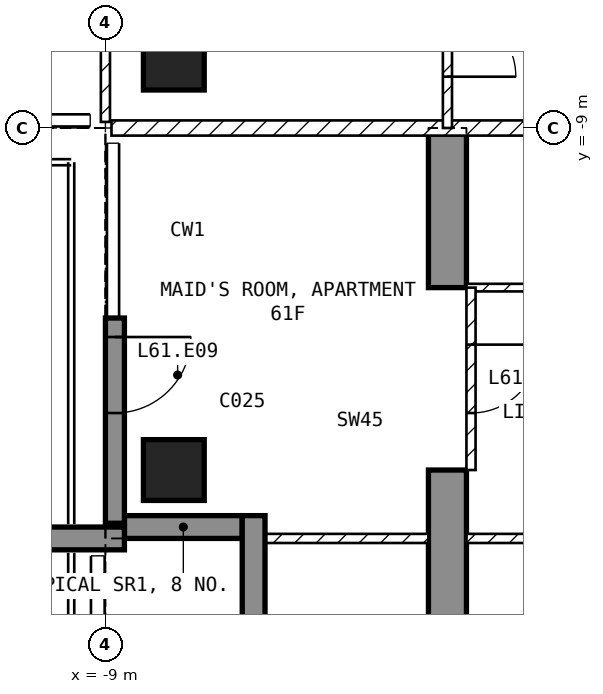
"""IFC4 building model, lengths in metres.
Left out: names, types, materials, properties, quantities, classifications, styles, units other than length and angle.
Written with IfcOpenShell. Run it as: python <this file> out.ifc"""

import sys

from ifc_helpers import new_model, si_unit, direction, frame, frame_2d, origin, origin_2d, place, context, subcontext, project, spatial, polyline, rectangle, outline, extrude, element, fill, save


model = new_model("IFC4")
c1 = context("Model", 3, precision=1e-05, world=origin(), true_north=direction((0.0, 1.0)))
c2 = subcontext(c1, "Body", "Model", "MODEL_VIEW")
j1 = project(units=[si_unit("LENGTHUNIT", "METRE"), si_unit("PLANEANGLEUNIT", "RADIAN")], contexts=[c1])
p1 = place(None, origin())
s1 = spatial("IfcSite", under=j1, at=p1, CompositionType="ELEMENT")
p2 = place(p1, origin())
s2 = spatial("IfcBuilding", under=s1, at=p2, CompositionType="ELEMENT")
p3 = place(p2, frame((0.0, 0.0, 243.0)))
s3 = spatial("IfcBuildingStorey", under=s2, at=p3, CompositionType="ELEMENT", Elevation=243.0)
for number, where, z_axis, x_axis in (
    (1, (-8.1, -13.5, -0.25), (0.0, 0.0, 1.0), (1.0, 0.0, 0.0)),
    (2, (-8.1, -8.1, -0.25), (0.0, 0.0, 1.0), (1.0, 0.0, 0.0)),
):
    element("IfcColumn", number, at=place(p3, frame(where, z_axis=z_axis, x_axis=x_axis)), inside=s3, PredefinedType="COLUMN", context=c2, shape_type="SweptSolid", body=[
        extrude(rectangle(XDim=0.8, YDim=0.8, at=origin_2d()), origin(), (0.0, 0.0, 1.0), 3.5),
    ])
p4 = place(p3, frame((-4.75, -16.7, -0.25), z_axis=(1.0, 0.0, 0.0), x_axis=(0.0, 1.0, 0.0)))
e3 = element("IfcWall", 3, at=p4, inside=s3, PredefinedType="SHEAR", context=c2, shape_type="SweptSolid", body=[
    extrude(outline(polyline([(0.0, 0.0), (3.2, 0.0), (3.2, 2.65), (5.6, 2.65), (5.6, 0.0), (7.7, 0.0), (7.7, 3.5), (0.0, 3.5), (0.0, 0.0)])), origin(), (0.0, 0.0, 1.0), 0.5),
])
p5 = place(p3, frame((-8.875, -11.5, 0.0), z_axis=(0.0, 0.0, 1.0), x_axis=(0.0, -1.0, 0.0)))
e4 = element("IfcWall", 4, at=p5, inside=s3, PredefinedType="SOLIDWALL", context=c2, shape_type="SweptSolid", body=[
    extrude(rectangle(XDim=2.7, YDim=0.25, at=frame_2d((1.35, 0.0))), origin(), (0.0, 0.0, 1.0), 3.25),
])
p6 = place(p5, frame((0.25, 0.0, 0.0)))
e5 = element("IfcOpeningElement", 5, at=p6, cuts=e4, PredefinedType="OPENING", context=c2, shape_type="SweptSolid", body=[
    extrude(rectangle(XDim=1.0, YDim=2.4, at=frame_2d((0.5, 1.2))), frame((0.0, 0.135, 0.0), z_axis=(0.0, -1.0, 0.0), x_axis=(1.0, 0.0, 0.0)), (0.0, 0.0, 1.0), 0.27),
])
p7 = place(p3, frame((-8.75, -14.25, 0.0), z_axis=(0.0, 0.0, 1.0), x_axis=(1.0, 0.0, 0.0)))
e6 = element("IfcWall", 6, at=p7, inside=s3, PredefinedType="SOLIDWALL", context=c2, shape_type="SweptSolid", body=[
    extrude(rectangle(XDim=1.55, YDim=0.3, at=frame_2d((0.775, 0.0))), origin(), (0.0, 0.0, 1.0), 3.25),
])
p8 = place(p3, frame((-7.05, -14.1, 0.0), z_axis=(0.0, 0.0, 1.0), x_axis=(0.0, -1.0, 0.0)))
e7 = element("IfcWall", 7, at=p8, inside=s3, PredefinedType="SOLIDWALL", context=c2, shape_type="SweptSolid", body=[
    extrude(rectangle(XDim=1.8, YDim=0.3, at=frame_2d((0.9, 0.0))), origin(), (0.0, 0.0, 1.0), 3.25),
])
p9 = place(p3, frame((-8.75, -14.4, 0.0), z_axis=(0.0, 0.0, 1.0), x_axis=(-1.0, 0.0, 0.0)))
e8 = element("IfcWall", 8, at=p9, inside=s3, PredefinedType="SOLIDWALL", context=c2, shape_type="SweptSolid", body=[
    extrude(rectangle(XDim=2.95, YDim=0.3, at=frame_2d((1.475, 0.0))), origin(), (0.0, 0.0, 1.0), 3.25),
])
p10 = place(p3, frame((8.92, -9.0, 0.0), z_axis=(0.0, 0.0, 1.0), x_axis=(-1.0, 0.0, 0.0)))
e9 = element("IfcWall", 9, at=p10, inside=s3, PredefinedType="PARTITIONING", context=c2, shape_type="SweptSolid", body=[
    extrude(rectangle(XDim=17.84, YDim=0.2, at=frame_2d((8.92, 0.0))), origin(), (0.0, 0.0, 1.0), 3.25),
])
p11 = place(p10, frame((8.42, 0.0, 0.0)))
e10 = element("IfcOpeningElement", 10, at=p11, cuts=e9, PredefinedType="OPENING", context=c2, shape_type="SweptSolid", body=[
    extrude(rectangle(XDim=1.0, YDim=2.1, at=frame_2d((0.5, 1.05))), frame((0.0, 0.11, 0.0), z_axis=(0.0, -1.0, 0.0), x_axis=(1.0, 0.0, 0.0)), (0.0, 0.0, 1.0), 0.22),
])
p12 = place(p3, frame((-9.0, -1.3, 0.0), z_axis=(0.0, 0.0, 1.0), x_axis=(0.0, -1.0, 0.0)))
e11 = element("IfcWall", 11, at=p12, inside=s3, PredefinedType="PARTITIONING", context=c2, shape_type="SweptSolid", body=[
    extrude(rectangle(XDim=7.62, YDim=0.12, at=frame_2d((3.81, 0.0))), origin(), (0.0, 0.0, 1.0), 3.25),
])
p13 = place(p12, frame((1.45, 0.0, 0.0)))
e12 = element("IfcOpeningElement", 12, at=p13, cuts=e11, PredefinedType="OPENING", context=c2, shape_type="SweptSolid", body=[
    extrude(rectangle(XDim=0.9, YDim=2.1, at=frame_2d((0.45, 1.05))), frame((0.0, 0.07, 0.0), z_axis=(0.0, -1.0, 0.0), x_axis=(1.0, 0.0, 0.0)), (0.0, 0.0, 1.0), 0.14),
])
p14 = place(p3, frame((-4.5, -6.75, 0.0), z_axis=(0.0, 0.0, 1.0), x_axis=(0.0, -1.0, 0.0)))
e13 = element("IfcWall", 13, at=p14, inside=s3, PredefinedType="PARTITIONING", context=c2, shape_type="SweptSolid", body=[
    extrude(rectangle(XDim=2.25, YDim=0.12, at=frame_2d((1.125, 0.0))), origin(), (0.0, 0.0, 1.0), 3.25),
])
p15 = place(p14, frame((0.675, 0.0, 0.0)))
e14 = element("IfcOpeningElement", 14, at=p15, cuts=e13, PredefinedType="OPENING", context=c2, shape_type="SweptSolid", body=[
    extrude(rectangle(XDim=0.9, YDim=2.1, at=frame_2d((0.45, 1.05))), frame((0.0, 0.07, 0.0), z_axis=(0.0, -1.0, 0.0), x_axis=(1.0, 0.0, 0.0)), (0.0, 0.0, 1.0), 0.14),
])
p16 = place(p3, frame((-2.1, -11.1, 0.0), z_axis=(0.0, 0.0, 1.0), x_axis=(-1.0, 0.0, 0.0)))
e15 = element("IfcWall", 15, at=p16, inside=s3, PredefinedType="PARTITIONING", context=c2, shape_type="SweptSolid", body=[
    extrude(rectangle(XDim=2.15, YDim=0.1, at=frame_2d((1.075, 0.0))), origin(), (0.0, 0.0, 1.0), 3.25),
])
p17 = place(p3, frame((4.25, -14.4, 0.0), z_axis=(0.0, 0.0, 1.0), x_axis=(-1.0, 0.0, 0.0)))
e16 = element("IfcWall", 16, at=p17, inside=s3, PredefinedType="PARTITIONING", context=c2, shape_type="SweptSolid", body=[
    extrude(rectangle(XDim=8.5, YDim=0.12, at=frame_2d((4.25, 0.0))), origin(), (0.0, 0.0, 1.0), 3.25),
])
p18 = place(p17, frame((5.675, 0.0, 0.0)))
e17 = element("IfcOpeningElement", 17, at=p18, cuts=e16, PredefinedType="OPENING", context=c2, shape_type="SweptSolid", body=[
    extrude(rectangle(XDim=0.9, YDim=2.1, at=frame_2d((0.45, 1.05))), frame((0.0, 0.07, 0.0), z_axis=(0.0, -1.0, 0.0), x_axis=(1.0, 0.0, 0.0)), (0.0, 0.0, 1.0), 0.14),
])
p19 = place(p3, frame((-4.75, -14.4, 0.0), z_axis=(0.0, 0.0, 1.0), x_axis=(-1.0, 0.0, 0.0)))
e18 = element("IfcWall", 18, at=p19, inside=s3, PredefinedType="PARTITIONING", context=c2, shape_type="SweptSolid", body=[
    extrude(rectangle(XDim=2.37, YDim=0.12, at=frame_2d((1.185, 0.0))), origin(), (0.0, 0.0, 1.0), 3.25),
])
p20 = place(p3, frame((-4.19, -11.1, 0.0), z_axis=(0.0, 0.0, 1.0), x_axis=(0.0, -1.0, 0.0)))
e19 = element("IfcWall", 19, at=p20, inside=s3, PredefinedType="PARTITIONING", context=c2, shape_type="SweptSolid", body=[
    extrude(rectangle(XDim=2.4, YDim=0.12, at=frame_2d((1.2, 0.0))), origin(), (0.0, 0.0, 1.0), 2.4),
])
p21 = place(p20, frame((0.75, 0.0, 0.0)))
e20 = element("IfcOpeningElement", 20, at=p21, cuts=e19, PredefinedType="OPENING", context=c2, shape_type="SweptSolid", body=[
    extrude(rectangle(XDim=0.9, YDim=2.1, at=frame_2d((0.45, 1.05))), frame((0.0, 0.07, 0.0), z_axis=(0.0, -1.0, 0.0), x_axis=(1.0, 0.0, 0.0)), (0.0, 0.0, 1.0), 0.14),
])
p22 = place(p6, origin())
e21 = element("IfcDoor", 21, at=p22, inside=s3, OperationType="SINGLE_SWING_LEFT", PredefinedType="DOOR", context=c2, shape_type="SweptSolid", body=[
    extrude(rectangle(XDim=1.0, YDim=2.4, at=frame_2d((0.5, 1.2))), frame((0.0, 0.025, 0.0), z_axis=(0.0, -1.0, 0.0), x_axis=(1.0, 0.0, 0.0)), (0.0, 0.0, 1.0), 0.05),
])
fill(e5, e21)
p23 = place(p15, origin())
e22 = element("IfcDoor", 22, at=p23, inside=s3, OperationType="SINGLE_SWING_RIGHT", PredefinedType="DOOR", context=c2, shape_type="SweptSolid", body=[
    extrude(rectangle(XDim=0.9, YDim=2.1, at=frame_2d((0.45, 1.05))), frame((0.0, 0.025, 0.0), z_axis=(0.0, -1.0, 0.0), x_axis=(1.0, 0.0, 0.0)), (0.0, 0.0, 1.0), 0.05),
])
fill(e14, e22)
p24 = place(p21, origin())
e23 = element("IfcDoor", 23, at=p24, inside=s3, OperationType="SINGLE_SWING_LEFT", PredefinedType="DOOR", context=c2, shape_type="SweptSolid", body=[
    extrude(rectangle(XDim=0.9, YDim=2.1, at=frame_2d((0.45, 1.05))), frame((0.0, 0.025, 0.0), z_axis=(0.0, -1.0, 0.0), x_axis=(1.0, 0.0, 0.0)), (0.0, 0.0, 1.0), 0.05),
])
fill(e20, e23)
save(model, sys.argv[1])
